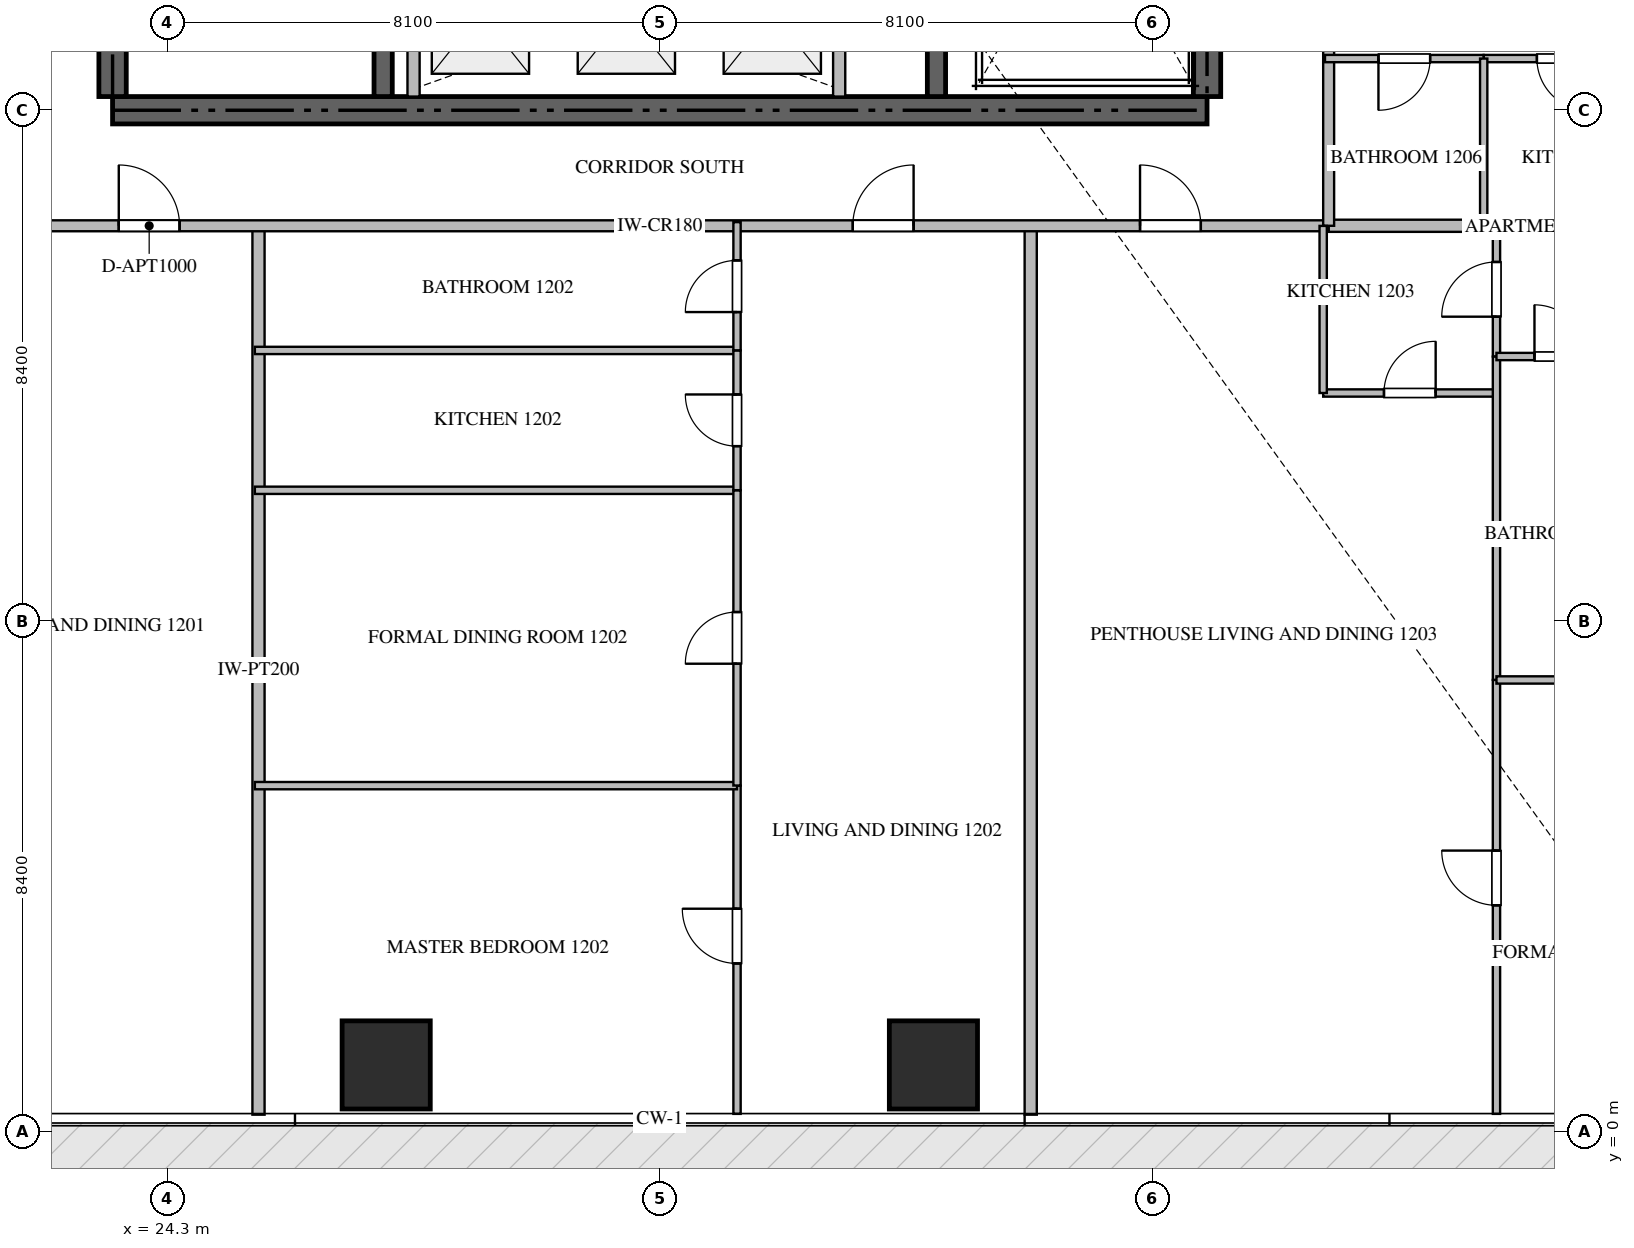
"""IFC4 building model, lengths in metres.
Left out: names, types, materials, properties, quantities, classifications, styles, units other than length and angle.
Written with IfcOpenShell. Run it as: python <this file> out.ifc"""

import sys

from ifc_helpers import new_model, si_unit, direction, frame, frame_2d, origin, origin_2d, place, context, subcontext, project, spatial, rectangle, extrude, source, transform, mapped, element, fill, save


model = new_model("IFC4")
c1 = context("Model", 3, precision=1e-05, world=origin(), true_north=direction((0.0, 1.0)))
c2 = subcontext(c1, "Body", "Model", "MODEL_VIEW")
j1 = project(units=[si_unit("LENGTHUNIT", "METRE"), si_unit("PLANEANGLEUNIT", "RADIAN")], contexts=[c1])
p1 = place(None, origin())
s1 = spatial("IfcSite", under=j1, at=p1, CompositionType="ELEMENT")
p2 = place(p1, origin())
s2 = spatial("IfcBuilding", under=s1, at=p2, CompositionType="ELEMENT")
p3 = place(p2, frame((0.0, 0.0, 52.95)))
s3 = spatial("IfcBuildingStorey", under=s2, at=p3, CompositionType="ELEMENT", Elevation=52.95)
p4 = place(p3, frame((23.4, 16.8, -0.26), z_axis=(0.0, 0.0, 1.0), x_axis=(1.0, 0.0, 0.0)))
e1 = element("IfcWall", 1, at=p4, inside=s3, PredefinedType="SHEAR", context=c2, shape_type="SweptSolid", body=[
    extrude(rectangle(XDim=18.0, YDim=0.45, at=frame_2d((9.0, 0.0))), origin(), (0.0, 0.0, 1.0), 3.748),
])
p5 = place(p3, frame((23.4, 17.025, -0.26), z_axis=(0.0, 0.0, 1.0), x_axis=(0.0, 1.0, 0.0)))
e2 = element("IfcWall", 2, at=p5, inside=s3, PredefinedType="SHEAR", context=c2, shape_type="SweptSolid", body=[
    extrude(rectangle(XDim=4.825, YDim=0.45, at=frame_2d((2.413, 0.0))), origin(), (0.0, 0.0, 1.0), 3.748),
])
p6 = place(p3, frame((41.4, 17.025, -0.26), z_axis=(0.0, 0.0, 1.0), x_axis=(0.0, 1.0, 0.0)))
e3 = element("IfcWall", 3, at=p6, inside=s3, PredefinedType="SHEAR", context=c2, shape_type="SweptSolid", body=[
    extrude(rectangle(XDim=8.325, YDim=0.45, at=frame_2d((4.163, 0.0))), origin(), (0.0, 0.0, 1.0), 3.748),
])
p7 = place(p3, frame((27.85, 17.025, -0.26), z_axis=(0.0, 0.0, 1.0), x_axis=(0.0, 1.0, 0.0)))
e4 = element("IfcWall", 4, at=p7, inside=s3, PredefinedType="SHEAR", context=c2, shape_type="SweptSolid", body=[
    extrude(rectangle(XDim=4.825, YDim=0.3, at=frame_2d((2.413, 0.0))), origin(), (0.0, 0.0, 1.0), 3.748),
])
p8 = place(p3, frame((36.95, 17.025, -0.26), z_axis=(0.0, 0.0, 1.0), x_axis=(0.0, 1.0, 0.0)))
e5 = element("IfcWall", 5, at=p8, inside=s3, PredefinedType="SHEAR", context=c2, shape_type="SweptSolid", body=[
    extrude(rectangle(XDim=8.325, YDim=0.3, at=frame_2d((4.163, 0.0))), origin(), (0.0, 0.0, 1.0), 3.748),
])
m1 = source(origin(), c2, "Body", "SweptSolid", [
    extrude(rectangle(XDim=1.45, YDim=1.45, at=origin_2d()), origin(), (0.0, 0.0, 1.0), 3.75),
])
for number, where, z_axis, x_axis in (
    (6, (27.9, 1.1, -0.26), (0.0, 0.0, 1.0), (1.0, 0.0, 0.0)),
    (7, (36.9, 1.1, -0.26), (0.0, 0.0, 1.0), (1.0, 0.0, 0.0)),
):
    element("IfcColumn", number, at=place(p3, frame(where, z_axis=z_axis, x_axis=x_axis)), inside=s3, PredefinedType="COLUMN", context=c2, shape_type="MappedRepresentation", body=[
        mapped(m1, transform((0.0, 0.0, 0.0), scale=1.0)),
    ])
for number, where, z_axis, x_axis in (
    (8, (28.35, 17.025, 0.0), (0.0, 0.0, 1.0), (0.0, 1.0, 0.0)),
    (9, (35.35, 17.025, 0.0), (0.0, 0.0, 1.0), (0.0, 1.0, 0.0)),
):
    element("IfcWall", number, at=place(p3, frame(where, z_axis=z_axis, x_axis=x_axis)), inside=s3, PredefinedType="STANDARD", context=c2, shape_type="SweptSolid", body=[
        extrude(rectangle(XDim=2.525, YDim=0.2, at=frame_2d((1.263, 0.0))), origin(), (0.0, 0.0, 1.0), 3.49),
    ])
for number, where, z_axis, x_axis in (
    (10, (25.8, 0.282, 0.0), (0.0, 0.0, 1.0), (0.0, 1.0, 0.0)),
    (11, (38.5, 0.282, 0.0), (0.0, 0.0, 1.0), (0.0, 1.0, 0.0)),
):
    element("IfcWall", number, at=place(p3, frame(where, z_axis=z_axis, x_axis=x_axis)), inside=s3, PredefinedType="PARTITIONING", context=c2, shape_type="SweptSolid", body=[
        extrude(rectangle(XDim=14.618, YDim=0.2, at=frame_2d((7.309, 0.0))), origin(), (0.0, 0.0, 1.0), 3.49),
    ])
p9 = place(p3, frame((43.4, 14.9, 0.0), z_axis=(0.0, 0.0, 1.0), x_axis=(1.0, 0.0, 0.0)))
e12 = element("IfcWall", 12, at=p9, inside=s3, PredefinedType="PARTITIONING", context=c2, shape_type="SweptSolid", body=[
    extrude(rectangle(XDim=15.318, YDim=0.2, at=frame_2d((7.659, 0.0))), origin(), (0.0, 0.0, 1.0), 3.49),
])
p10 = place(p3, frame((21.402, 14.9, 0.0), z_axis=(0.0, 0.0, 1.0), x_axis=(1.0, 0.0, 0.0)))
e13 = element("IfcWall", 13, at=p10, inside=s3, PredefinedType="PARTITIONING", context=c2, shape_type="SweptSolid", body=[
    extrude(rectangle(XDim=21.996, YDim=0.18, at=frame_2d((10.998, 0.0))), origin(), (0.0, 0.0, 1.0), 3.49),
])
p11 = place(p10, frame((2.1, 0.0, 0.0)))
e14 = element("IfcOpeningElement", 14, at=p11, cuts=e13, PredefinedType="OPENING", context=c2, shape_type="SweptSolid", body=[
    extrude(rectangle(XDim=1.0, YDim=2.15, at=frame_2d((0.5, 1.075))), frame((0.0, 0.1, 0.0), z_axis=(0.0, -1.0, 0.0), x_axis=(1.0, 0.0, 0.0)), (0.0, 0.0, 1.0), 0.2),
])
p12 = place(p10, frame((14.172, 0.0, 0.0)))
e15 = element("IfcOpeningElement", 15, at=p12, cuts=e13, PredefinedType="OPENING", context=c2, shape_type="SweptSolid", body=[
    extrude(rectangle(XDim=1.0, YDim=2.15, at=frame_2d((0.5, 1.075))), frame((0.0, 0.1, 0.0), z_axis=(0.0, -1.0, 0.0), x_axis=(1.0, 0.0, 0.0)), (0.0, 0.0, 1.0), 0.2),
])
p13 = place(p10, frame((18.896, 0.0, 0.0)))
e16 = element("IfcOpeningElement", 16, at=p13, cuts=e13, PredefinedType="OPENING", context=c2, shape_type="SweptSolid", body=[
    extrude(rectangle(XDim=1.0, YDim=2.15, at=frame_2d((0.5, 1.075))), frame((0.0, 0.1, 0.0), z_axis=(0.0, -1.0, 0.0), x_axis=(1.0, 0.0, 0.0)), (0.0, 0.0, 1.0), 0.2),
])
p14 = place(p3, frame((43.4, 14.9, 0.0), z_axis=(0.0, 0.0, 1.0), x_axis=(0.0, 1.0, 0.0)))
e17 = element("IfcWall", 17, at=p14, inside=s3, PredefinedType="PARTITIONING", context=c2, shape_type="SweptSolid", body=[
    extrude(rectangle(XDim=20.6, YDim=0.18, at=frame_2d((10.3, 0.0))), origin(), (0.0, 0.0, 1.0), 3.49),
])
p15 = place(p14, frame((5.821, 0.0, 0.0)))
e18 = element("IfcOpeningElement", 18, at=p15, cuts=e17, PredefinedType="OPENING", context=c2, shape_type="SweptSolid", body=[
    extrude(rectangle(XDim=1.0, YDim=2.15, at=frame_2d((0.5, 1.075))), frame((0.0, 0.1, 0.0), z_axis=(0.0, -1.0, 0.0), x_axis=(1.0, 0.0, 0.0)), (0.0, 0.0, 1.0), 0.2),
])
p16 = place(p14, frame((10.898, 0.0, 0.0)))
e19 = element("IfcOpeningElement", 19, at=p16, cuts=e17, PredefinedType="OPENING", context=c2, shape_type="SweptSolid", body=[
    extrude(rectangle(XDim=1.0, YDim=2.15, at=frame_2d((0.5, 1.075))), frame((0.0, 0.1, 0.0), z_axis=(0.0, -1.0, 0.0), x_axis=(1.0, 0.0, 0.0)), (0.0, 0.0, 1.0), 0.2),
])
p17 = place(p3, frame((33.67, 0.295, 0.0), z_axis=(0.0, 0.0, 1.0), x_axis=(0.0, 1.0, 0.0)))
e20 = element("IfcWall", 20, at=p17, inside=s3, PredefinedType="PARTITIONING", context=c2, shape_type="SweptSolid", body=[
    extrude(rectangle(XDim=5.398, YDim=0.12, at=frame_2d((2.699, 0.0))), origin(), (0.0, 0.0, 1.0), 3.49),
])
p18 = place(p17, frame((2.474, 0.0, 0.0)))
e21 = element("IfcOpeningElement", 21, at=p18, cuts=e20, PredefinedType="OPENING", context=c2, shape_type="SweptSolid", body=[
    extrude(rectangle(XDim=0.9, YDim=2.1, at=frame_2d((0.45, 1.05))), frame((0.0, 0.07, 0.0), z_axis=(0.0, -1.0, 0.0), x_axis=(1.0, 0.0, 0.0)), (0.0, 0.0, 1.0), 0.14),
])
for number, where, z_axis, x_axis in (
    (22, (25.74, 5.693, 0.0), (0.0, 0.0, 1.0), (1.0, 0.0, 0.0)),
    (23, (25.74, 10.55, 0.0), (0.0, 0.0, 1.0), (1.0, 0.0, 0.0)),
    (24, (25.74, 12.85, 0.0), (0.0, 0.0, 1.0), (1.0, 0.0, 0.0)),
):
    element("IfcWall", number, at=place(p3, frame(where, z_axis=z_axis, x_axis=x_axis)), inside=s3, PredefinedType="PARTITIONING", context=c2, shape_type="SweptSolid", body=[
        extrude(rectangle(XDim=7.93, YDim=0.12, at=frame_2d((3.965, 0.0))), origin(), (0.0, 0.0, 1.0), 3.49),
    ])
p19 = place(p3, frame((33.67, 5.695, 0.0), z_axis=(0.0, 0.0, 1.0), x_axis=(0.0, 1.0, 0.0)))
e25 = element("IfcWall", 25, at=p19, inside=s3, PredefinedType="PARTITIONING", context=c2, shape_type="SweptSolid", body=[
    extrude(rectangle(XDim=4.855, YDim=0.12, at=frame_2d((2.427, 0.0))), origin(), (0.0, 0.0, 1.0), 3.49),
])
p20 = place(p19, frame((2.003, 0.0, 0.0)))
e26 = element("IfcOpeningElement", 26, at=p20, cuts=e25, PredefinedType="OPENING", context=c2, shape_type="SweptSolid", body=[
    extrude(rectangle(XDim=0.85, YDim=2.1, at=frame_2d((0.425, 1.05))), frame((0.0, 0.07, 0.0), z_axis=(0.0, -1.0, 0.0), x_axis=(1.0, 0.0, 0.0)), (0.0, 0.0, 1.0), 0.14),
])
p21 = place(p3, frame((33.67, 10.552, 0.0), z_axis=(0.0, 0.0, 1.0), x_axis=(0.0, 1.0, 0.0)))
e27 = element("IfcWall", 27, at=p21, inside=s3, PredefinedType="PARTITIONING", context=c2, shape_type="SweptSolid", body=[
    extrude(rectangle(XDim=2.298, YDim=0.12, at=frame_2d((1.149, 0.0))), origin(), (0.0, 0.0, 1.0), 3.49),
])
p22 = place(p21, frame((0.724, 0.0, 0.0)))
e28 = element("IfcOpeningElement", 28, at=p22, cuts=e27, PredefinedType="OPENING", context=c2, shape_type="SweptSolid", body=[
    extrude(rectangle(XDim=0.85, YDim=2.1, at=frame_2d((0.425, 1.05))), frame((0.0, 0.07, 0.0), z_axis=(0.0, -1.0, 0.0), x_axis=(1.0, 0.0, 0.0)), (0.0, 0.0, 1.0), 0.14),
])
p23 = place(p3, frame((33.67, 12.852, 0.0), z_axis=(0.0, 0.0, 1.0), x_axis=(0.0, 1.0, 0.0)))
e29 = element("IfcWall", 29, at=p23, inside=s3, PredefinedType="PARTITIONING", context=c2, shape_type="SweptSolid", body=[
    extrude(rectangle(XDim=2.108, YDim=0.12, at=frame_2d((1.054, 0.0))), origin(), (0.0, 0.0, 1.0), 3.49),
])
p24 = place(p23, frame((0.629, 0.0, 0.0)))
e30 = element("IfcOpeningElement", 30, at=p24, cuts=e29, PredefinedType="OPENING", context=c2, shape_type="SweptSolid", body=[
    extrude(rectangle(XDim=0.85, YDim=2.1, at=frame_2d((0.425, 1.05))), frame((0.0, 0.07, 0.0), z_axis=(0.0, -1.0, 0.0), x_axis=(1.0, 0.0, 0.0)), (0.0, 0.0, 1.0), 0.14),
])
p25 = place(p3, frame((43.31, 12.15, 0.0), z_axis=(0.0, 0.0, 1.0), x_axis=(1.0, 0.0, 0.0)))
e31 = element("IfcWall", 31, at=p25, inside=s3, PredefinedType="PARTITIONING", context=c2, shape_type="SweptSolid", body=[
    extrude(rectangle(XDim=2.85, YDim=0.12, at=frame_2d((1.425, 0.0))), origin(), (0.0, 0.0, 1.0), 3.49),
])
p26 = place(p25, frame((1.0, 0.0, 0.0)))
e32 = element("IfcOpeningElement", 32, at=p26, cuts=e31, PredefinedType="OPENING", context=c2, shape_type="SweptSolid", body=[
    extrude(rectangle(XDim=0.85, YDim=2.1, at=frame_2d((0.425, 1.05))), frame((0.0, 0.07, 0.0), z_axis=(0.0, -1.0, 0.0), x_axis=(1.0, 0.0, 0.0)), (0.0, 0.0, 1.0), 0.14),
])
p27 = place(p3, frame((43.31, 12.15, 0.0), z_axis=(0.0, 0.0, 1.0), x_axis=(0.0, 1.0, 0.0)))
e33 = element("IfcWall", 33, at=p27, inside=s3, PredefinedType="PARTITIONING", context=c2, shape_type="SweptSolid", body=[
    extrude(rectangle(XDim=2.748, YDim=0.12, at=frame_2d((1.374, 0.0))), origin(), (0.0, 0.0, 1.0), 3.49),
])
p28 = place(p3, frame((46.16, 12.75, 0.0), z_axis=(0.0, 0.0, 1.0), x_axis=(0.0, 1.0, 0.0)))
e34 = element("IfcWall", 34, at=p28, inside=s3, PredefinedType="PARTITIONING", context=c2, shape_type="SweptSolid", body=[
    extrude(rectangle(XDim=2.21, YDim=0.12, at=frame_2d((1.105, 0.0))), origin(), (0.0, 0.0, 1.0), 3.49),
])
p29 = place(p28, frame((0.655, 0.0, 0.0)))
e35 = element("IfcOpeningElement", 35, at=p29, cuts=e34, PredefinedType="OPENING", context=c2, shape_type="SweptSolid", body=[
    extrude(rectangle(XDim=0.9, YDim=2.1, at=frame_2d((0.45, 1.05))), frame((0.0, 0.07, 0.0), z_axis=(0.0, -1.0, 0.0), x_axis=(1.0, 0.0, 0.0)), (0.0, 0.0, 1.0), 0.14),
])
p30 = place(p3, frame((46.16, 0.295, 0.0), z_axis=(0.0, 0.0, 1.0), x_axis=(0.0, 1.0, 0.0)))
e36 = element("IfcWall", 36, at=p30, inside=s3, PredefinedType="PARTITIONING", context=c2, shape_type="SweptSolid", body=[
    extrude(rectangle(XDim=7.136, YDim=0.12, at=frame_2d((3.568, 0.0))), origin(), (0.0, 0.0, 1.0), 3.49),
])
p31 = place(p30, frame((3.43, 0.0, 0.0)))
e37 = element("IfcOpeningElement", 37, at=p31, cuts=e36, PredefinedType="OPENING", context=c2, shape_type="SweptSolid", body=[
    extrude(rectangle(XDim=0.9, YDim=2.1, at=frame_2d((0.45, 1.05))), frame((0.0, 0.07, 0.0), z_axis=(0.0, -1.0, 0.0), x_axis=(1.0, 0.0, 0.0)), (0.0, 0.0, 1.0), 0.14),
])
p32 = place(p3, frame((46.16, 7.433, 0.0), z_axis=(0.0, 0.0, 1.0), x_axis=(0.0, 1.0, 0.0)))
e38 = element("IfcWall", 38, at=p32, inside=s3, PredefinedType="PARTITIONING", context=c2, shape_type="SweptSolid", body=[
    extrude(rectangle(XDim=5.315, YDim=0.12, at=frame_2d((2.657, 0.0))), origin(), (0.0, 0.0, 1.0), 3.49),
])
p33 = place(p3, frame((46.16, 7.431, 0.0), z_axis=(0.0, 0.0, 1.0), x_axis=(1.0, 0.0, 0.0)))
e39 = element("IfcWall", 39, at=p33, inside=s3, PredefinedType="PARTITIONING", context=c2, shape_type="SweptSolid", body=[
    extrude(rectangle(XDim=5.15, YDim=0.12, at=frame_2d((2.575, 0.0))), origin(), (0.0, 0.0, 1.0), 3.49),
])
p34 = place(p3, frame((46.16, 12.75, 0.0), z_axis=(0.0, 0.0, 1.0), x_axis=(1.0, 0.0, 0.0)))
e40 = element("IfcWall", 40, at=p34, inside=s3, PredefinedType="PARTITIONING", context=c2, shape_type="SweptSolid", body=[
    extrude(rectangle(XDim=2.1, YDim=0.12, at=frame_2d((1.05, 0.0))), origin(), (0.0, 0.0, 1.0), 3.49),
])
p35 = place(p34, frame((0.625, 0.0, 0.0)))
e41 = element("IfcOpeningElement", 41, at=p35, cuts=e40, PredefinedType="OPENING", context=c2, shape_type="SweptSolid", body=[
    extrude(rectangle(XDim=0.85, YDim=2.1, at=frame_2d((0.425, 1.05))), frame((0.0, 0.07, 0.0), z_axis=(0.0, -1.0, 0.0), x_axis=(1.0, 0.0, 0.0)), (0.0, 0.0, 1.0), 0.14),
])
p36 = place(p3, frame((48.55, 17.65, 0.0), z_axis=(0.0, 0.0, 1.0), x_axis=(-1.0, 0.0, 0.0)))
e42 = element("IfcWall", 42, at=p36, inside=s3, PredefinedType="PARTITIONING", context=c2, shape_type="SweptSolid", body=[
    extrude(rectangle(XDim=2.6, YDim=0.12, at=frame_2d((1.3, 0.0))), origin(), (0.0, 0.0, 1.0), 3.49),
])
p37 = place(p36, frame((0.875, 0.0, 0.0)))
e43 = element("IfcOpeningElement", 43, at=p37, cuts=e42, PredefinedType="OPENING", context=c2, shape_type="SweptSolid", body=[
    extrude(rectangle(XDim=0.85, YDim=2.1, at=frame_2d((0.425, 1.05))), frame((0.0, 0.07, 0.0), z_axis=(0.0, -1.0, 0.0), x_axis=(1.0, 0.0, 0.0)), (0.0, 0.0, 1.0), 0.14),
])
p38 = place(p3, frame((45.948, 17.65, 0.0), z_axis=(0.0, 0.0, 1.0), x_axis=(-1.0, 0.0, 0.0)))
e44 = element("IfcWall", 44, at=p38, inside=s3, PredefinedType="PARTITIONING", context=c2, shape_type="SweptSolid", body=[
    extrude(rectangle(XDim=2.608, YDim=0.12, at=frame_2d((1.304, 0.0))), origin(), (0.0, 0.0, 1.0), 3.49),
])
p39 = place(p38, frame((0.879, 0.0, 0.0)))
e45 = element("IfcOpeningElement", 45, at=p39, cuts=e44, PredefinedType="OPENING", context=c2, shape_type="SweptSolid", body=[
    extrude(rectangle(XDim=0.85, YDim=2.1, at=frame_2d((0.425, 1.05))), frame((0.0, 0.07, 0.0), z_axis=(0.0, -1.0, 0.0), x_axis=(1.0, 0.0, 0.0)), (0.0, 0.0, 1.0), 0.14),
])
p40 = place(p3, frame((45.95, 14.84, 0.0), z_axis=(0.0, 0.0, 1.0), x_axis=(0.0, 1.0, 0.0)))
e46 = element("IfcWall", 46, at=p40, inside=s3, PredefinedType="PARTITIONING", context=c2, shape_type="SweptSolid", body=[
    extrude(rectangle(XDim=2.81, YDim=0.12, at=frame_2d((1.405, 0.0))), origin(), (0.0, 0.0, 1.0), 3.49),
])
m2 = source(origin(), c2, "Body", "SweptSolid", [
    extrude(rectangle(XDim=1.0, YDim=2.15, at=frame_2d((0.5, 1.075))), frame((0.0, 0.025, 0.0), z_axis=(0.0, -1.0, 0.0), x_axis=(1.0, 0.0, 0.0)), (0.0, 0.0, 1.0), 0.05),
])
p41 = place(p11, origin())
e47 = element("IfcDoor", 47, at=p41, inside=s3, OperationType="SINGLE_SWING_LEFT", PredefinedType="DOOR", context=c2, shape_type="MappedRepresentation", body=[
    mapped(m2, transform((0.0, 0.0, 0.0), scale=1.0)),
])
fill(e14, e47)
p42 = place(p12, origin())
e48 = element("IfcDoor", 48, at=p42, inside=s3, OperationType="SINGLE_SWING_RIGHT", PredefinedType="DOOR", context=c2, shape_type="MappedRepresentation", body=[
    mapped(m2, transform((0.0, 0.0, 0.0), scale=1.0)),
])
fill(e15, e48)
p43 = place(p13, origin())
e49 = element("IfcDoor", 49, at=p43, inside=s3, OperationType="SINGLE_SWING_LEFT", PredefinedType="DOOR", context=c2, shape_type="MappedRepresentation", body=[
    mapped(m2, transform((0.0, 0.0, 0.0), scale=1.0)),
])
fill(e16, e49)
m3 = source(origin(), c2, "Body", "SweptSolid", [
    extrude(rectangle(XDim=0.9, YDim=2.1, at=frame_2d((0.45, 1.05))), frame((0.0, 0.025, 0.0), z_axis=(0.0, -1.0, 0.0), x_axis=(1.0, 0.0, 0.0)), (0.0, 0.0, 1.0), 0.05),
])
p44 = place(p18, origin())
e50 = element("IfcDoor", 50, at=p44, inside=s3, OperationType="SINGLE_SWING_RIGHT", PredefinedType="DOOR", context=c2, shape_type="MappedRepresentation", body=[
    mapped(m3, transform((0.0, 0.0, 0.0), scale=1.0)),
])
fill(e21, e50)
m4 = source(origin(), c2, "Body", "SweptSolid", [
    extrude(rectangle(XDim=0.85, YDim=2.1, at=frame_2d((0.425, 1.05))), frame((0.0, 0.025, 0.0), z_axis=(0.0, -1.0, 0.0), x_axis=(1.0, 0.0, 0.0)), (0.0, 0.0, 1.0), 0.05),
])
p45 = place(p20, origin())
e51 = element("IfcDoor", 51, at=p45, inside=s3, OperationType="SINGLE_SWING_LEFT", PredefinedType="DOOR", context=c2, shape_type="MappedRepresentation", body=[
    mapped(m4, transform((0.0, 0.0, 0.0), scale=1.0)),
])
fill(e26, e51)
p46 = place(p22, origin())
e52 = element("IfcDoor", 52, at=p46, inside=s3, OperationType="SINGLE_SWING_RIGHT", PredefinedType="DOOR", context=c2, shape_type="MappedRepresentation", body=[
    mapped(m4, transform((0.0, 0.0, 0.0), scale=1.0)),
])
fill(e28, e52)
p47 = place(p24, origin())
e53 = element("IfcDoor", 53, at=p47, inside=s3, OperationType="SINGLE_SWING_LEFT", PredefinedType="DOOR", context=c2, shape_type="MappedRepresentation", body=[
    mapped(m4, transform((0.0, 0.0, 0.0), scale=1.0)),
])
fill(e30, e53)
p48 = place(p26, origin())
e54 = element("IfcDoor", 54, at=p48, inside=s3, OperationType="SINGLE_SWING_RIGHT", PredefinedType="DOOR", context=c2, shape_type="MappedRepresentation", body=[
    mapped(m4, transform((0.0, 0.0, 0.0), scale=1.0)),
])
fill(e32, e54)
p49 = place(p29, origin())
e55 = element("IfcDoor", 55, at=p49, inside=s3, OperationType="SINGLE_SWING_LEFT", PredefinedType="DOOR", context=c2, shape_type="MappedRepresentation", body=[
    mapped(m3, transform((0.0, 0.0, 0.0), scale=1.0)),
])
fill(e35, e55)
p50 = place(p31, origin())
e56 = element("IfcDoor", 56, at=p50, inside=s3, OperationType="SINGLE_SWING_RIGHT", PredefinedType="DOOR", context=c2, shape_type="MappedRepresentation", body=[
    mapped(m3, transform((0.0, 0.0, 0.0), scale=1.0)),
])
fill(e37, e56)
p51 = place(p35, origin())
e57 = element("IfcDoor", 57, at=p51, inside=s3, OperationType="SINGLE_SWING_LEFT", PredefinedType="DOOR", context=c2, shape_type="MappedRepresentation", body=[
    mapped(m4, transform((0.0, 0.0, 0.0), scale=1.0)),
])
fill(e41, e57)
p52 = place(p37, origin())
e58 = element("IfcDoor", 58, at=p52, inside=s3, OperationType="SINGLE_SWING_LEFT", PredefinedType="DOOR", context=c2, shape_type="MappedRepresentation", body=[
    mapped(m4, transform((0.0, 0.0, 0.0), scale=1.0)),
])
fill(e43, e58)
p53 = place(p39, origin())
e59 = element("IfcDoor", 59, at=p53, inside=s3, OperationType="SINGLE_SWING_RIGHT", PredefinedType="DOOR", context=c2, shape_type="MappedRepresentation", body=[
    mapped(m4, transform((0.0, 0.0, 0.0), scale=1.0)),
])
fill(e45, e59)
save(model, sys.argv[1])
